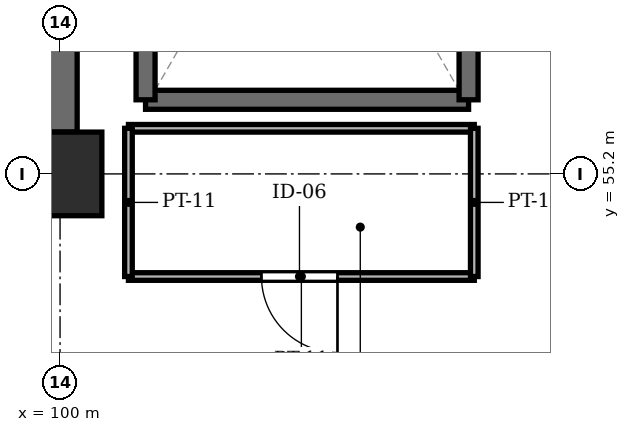
"""IFC4 building model, lengths in metres.
Left out: names, types, materials, properties, quantities, classifications, styles, units other than length and angle.
Written with IfcOpenShell. Run it as: python <this file> out.ifc"""

import sys

from ifc_helpers import new_model, si_unit, direction, frame, frame_2d, origin, origin_2d, place, context, subcontext, project, spatial, rectangle, extrude, element, fill, save


model = new_model("IFC4")
c1 = context("Model", 3, precision=1e-05, world=origin(), true_north=direction((0.0, 1.0)))
c2 = subcontext(c1, "Body", "Model", "MODEL_VIEW")
j1 = project(units=[si_unit("LENGTHUNIT", "METRE"), si_unit("PLANEANGLEUNIT", "RADIAN")], contexts=[c1])
p1 = place(None, origin())
s1 = spatial("IfcSite", under=j1, at=p1, CompositionType="ELEMENT")
p2 = place(p1, origin())
s2 = spatial("IfcBuilding", under=s1, at=p2, CompositionType="ELEMENT")
p3 = place(p2, frame((0.0, 0.0, 27.55)))
s3 = spatial("IfcBuildingStorey", under=s2, at=p3, CompositionType="ELEMENT", Elevation=27.55)
p4 = place(p3, frame((100.0, 55.2, -0.26), z_axis=(0.0, 0.0, 1.0), x_axis=(1.0, 0.0, 0.0)))
e1 = element("IfcColumn", 1, at=p4, inside=s3, PredefinedType="COLUMN", context=c2, shape_type="SweptSolid", body=[
    extrude(rectangle(XDim=1.1, YDim=1.1, at=origin_2d()), origin(), (0.0, 0.0, 1.0), 3.25),
])
p5 = place(p3, frame((100.0, 55.75, 0.0), z_axis=(0.0, 0.0, 1.0), x_axis=(0.0, 1.0, 0.0)))
e2 = element("IfcWall", 2, at=p5, inside=s3, PredefinedType="SHEAR", context=c2, shape_type="SweptSolid", body=[
    extrude(rectangle(XDim=6.2, YDim=0.45, at=frame_2d((3.1, 0.0))), origin(), (0.0, 0.0, 1.0), 2.99),
])
p6 = place(p3, frame((101.125, 56.175, 0.0), z_axis=(0.0, 0.0, 1.0), x_axis=(1.0, 0.0, 0.0)))
e3 = element("IfcWall", 3, at=p6, inside=s3, PredefinedType="SHEAR", context=c2, shape_type="SweptSolid", body=[
    extrude(rectangle(XDim=4.25, YDim=0.25, at=frame_2d((2.125, 0.0))), origin(), (0.0, 0.0, 1.0), 2.99),
])
for number, where, z_axis, x_axis in (
    (4, (101.125, 63.375, 0.0), (0.0, 0.0, 1.0), (0.0, -1.0, 0.0)),
    (5, (105.375, 56.175, 0.0), (0.0, 0.0, 1.0), (0.0, 1.0, 0.0)),
):
    element("IfcWall", number, at=place(p3, frame(where, z_axis=z_axis, x_axis=x_axis)), inside=s3, PredefinedType="SHEAR", context=c2, shape_type="SweptSolid", body=[
        extrude(rectangle(XDim=7.2, YDim=0.25, at=frame_2d((3.6, 0.0))), origin(), (0.0, 0.0, 1.0), 2.99),
    ])
p7 = place(p3, frame((100.9, 53.85, 0.0), z_axis=(0.0, 0.0, 1.0), x_axis=(1.0, 0.0, 0.0)))
e6 = element("IfcWall", 6, at=p7, inside=s3, PredefinedType="PARTITIONING", context=c2, shape_type="SweptSolid", body=[
    extrude(rectangle(XDim=4.55, YDim=0.1, at=frame_2d((2.275, 0.0))), origin(), (0.0, 0.0, 1.0), 2.53),
])
p8 = place(p7, frame((1.75, 0.0, 0.0)))
e7 = element("IfcOpeningElement", 7, at=p8, cuts=e6, PredefinedType="OPENING", context=c2, shape_type="SweptSolid", body=[
    extrude(rectangle(XDim=1.0, YDim=2.15, at=frame_2d((0.5, 1.075))), frame((0.0, 0.062, 0.0), z_axis=(0.0, -1.0, 0.0), x_axis=(1.0, 0.0, 0.0)), (0.0, 0.0, 1.0), 0.124),
])
p9 = place(p3, frame((100.9, 55.8, 0.0), z_axis=(0.0, 0.0, 1.0), x_axis=(1.0, 0.0, 0.0)))
e8 = element("IfcWall", 8, at=p9, inside=s3, PredefinedType="PARTITIONING", context=c2, shape_type="SweptSolid", body=[
    extrude(rectangle(XDim=4.55, YDim=0.1, at=frame_2d((2.275, 0.0))), origin(), (0.0, 0.0, 1.0), 2.53),
])
for number, where, z_axis, x_axis in (
    (9, (100.9, 53.85, 0.0), (0.0, 0.0, 1.0), (0.0, 1.0, 0.0)),
    (10, (105.45, 53.85, 0.0), (0.0, 0.0, 1.0), (0.0, 1.0, 0.0)),
):
    element("IfcWall", number, at=place(p3, frame(where, z_axis=z_axis, x_axis=x_axis)), inside=s3, PredefinedType="PARTITIONING", context=c2, shape_type="SweptSolid", body=[
        extrude(rectangle(XDim=1.95, YDim=0.1, at=frame_2d((0.975, 0.0))), origin(), (0.0, 0.0, 1.0), 2.53),
    ])
p10 = place(p8, frame((1.0, 0.0, 0.0), z_axis=(0.0, 0.0, 1.0), x_axis=(-1.0, 0.0, 0.0)))
e11 = element("IfcDoor", 11, at=p10, inside=s3, OperationType="SINGLE_SWING_RIGHT", PredefinedType="DOOR", context=c2, shape_type="SweptSolid", body=[
    extrude(rectangle(XDim=1.0, YDim=2.15, at=frame_2d((0.5, 1.075))), frame((0.0, 0.025, 0.0), z_axis=(0.0, -1.0, 0.0), x_axis=(1.0, 0.0, 0.0)), (0.0, 0.0, 1.0), 0.05),
])
fill(e7, e11)
save(model, sys.argv[1])
